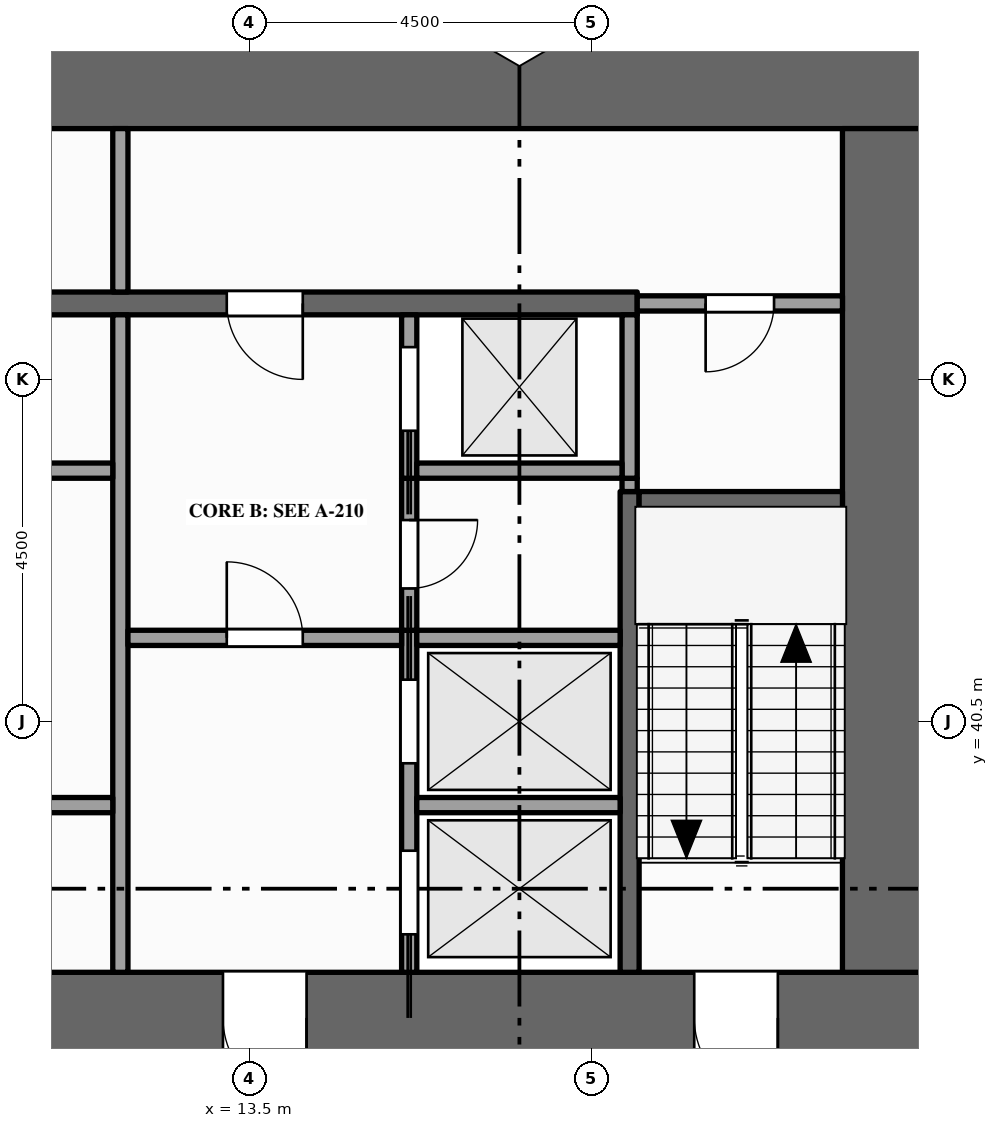
"""IFC4 building model, lengths in metres.
Left out: names, types, materials, properties, quantities, classifications, styles, units other than length and angle.
Written with IfcOpenShell. Run it as: python <this file> out.ifc"""

import sys

from ifc_helpers import new_model, si_unit, direction, frame, frame_2d, origin, place, context, subcontext, project, spatial, rectangle, extrude, element, fill, save


model = new_model("IFC4")
c1 = context("Model", 3, precision=1e-05, world=origin(), true_north=direction((0.0, 1.0)))
c2 = subcontext(c1, "Body", "Model", "MODEL_VIEW")
j1 = project(units=[si_unit("LENGTHUNIT", "METRE"), si_unit("PLANEANGLEUNIT", "RADIAN")], contexts=[c1])
p1 = place(None, origin())
s1 = spatial("IfcSite", under=j1, at=p1, CompositionType="ELEMENT")
p2 = place(p1, origin())
s2 = spatial("IfcBuilding", under=s1, at=p2, CompositionType="ELEMENT")
p3 = place(p2, frame((0.0, 0.0, 49.0)))
s3 = spatial("IfcBuildingStorey", under=s2, at=p3, CompositionType="ELEMENT", Elevation=49.0)
p4 = place(p3, frame((0.0, 36.6, -0.15), z_axis=(0.0, 0.0, 1.0), x_axis=(1.0, 0.0, 0.0)))
e1 = element("IfcWall", 1, at=p4, inside=s3, PredefinedType="SHEAR", context=c2, shape_type="SweptSolid", body=[
    extrude(rectangle(XDim=22.5, YDim=1.2, at=frame_2d((11.25, 0.0))), origin(), (0.0, 0.0, 1.0), 4.0),
])
p5 = place(p4, frame((7.1, 0.0, 0.15)))
e2 = element("IfcOpeningElement", 2, at=p5, cuts=e1, PredefinedType="OPENING", context=c2, shape_type="SweptSolid", body=[
    extrude(rectangle(XDim=1.8, YDim=2.1, at=frame_2d((0.9, 1.05))), frame((0.0, 0.61, 0.0), z_axis=(0.0, -1.0, 0.0), x_axis=(1.0, 0.0, 0.0)), (0.0, 0.0, 1.0), 1.22),
])
p6 = place(p4, frame((13.15, 0.0, 0.15)))
e3 = element("IfcOpeningElement", 3, at=p6, cuts=e1, PredefinedType="OPENING", context=c2, shape_type="SweptSolid", body=[
    extrude(rectangle(XDim=1.1, YDim=2.1, at=frame_2d((0.55, 1.05))), frame((0.0, 0.61, 0.0), z_axis=(0.0, -1.0, 0.0), x_axis=(1.0, 0.0, 0.0)), (0.0, 0.0, 1.0), 1.22),
])
p7 = place(p4, frame((2.15, 0.0, 0.15)))
e4 = element("IfcOpeningElement", 4, at=p7, cuts=e1, PredefinedType="OPENING", context=c2, shape_type="SweptSolid", body=[
    extrude(rectangle(XDim=1.1, YDim=2.1, at=frame_2d((0.55, 1.05))), frame((0.0, 0.61, 0.0), z_axis=(0.0, -1.0, 0.0), x_axis=(1.0, 0.0, 0.0)), (0.0, 0.0, 1.0), 1.22),
])
p8 = place(p4, frame((19.35, 0.0, 0.15)))
e5 = element("IfcOpeningElement", 5, at=p8, cuts=e1, PredefinedType="OPENING", context=c2, shape_type="SweptSolid", body=[
    extrude(rectangle(XDim=1.1, YDim=2.1, at=frame_2d((0.55, 1.05))), frame((0.0, 0.61, 0.0), z_axis=(0.0, -1.0, 0.0), x_axis=(1.0, 0.0, 0.0)), (0.0, 0.0, 1.0), 1.22),
])
p9 = place(p3, frame((0.0, 48.9, -0.15), z_axis=(0.0, 0.0, 1.0), x_axis=(1.0, 0.0, 0.0)))
e6 = element("IfcWall", 6, at=p9, inside=s3, PredefinedType="SHEAR", context=c2, shape_type="SweptSolid", body=[
    extrude(rectangle(XDim=22.5, YDim=1.2, at=frame_2d((11.25, 0.0))), origin(), (0.0, 0.0, 1.0), 4.0),
])
p10 = place(p3, frame((21.9, 37.2, -0.15), z_axis=(0.0, 0.0, 1.0), x_axis=(0.0, 1.0, 0.0)))
e7 = element("IfcWall", 7, at=p10, inside=s3, PredefinedType="SHEAR", context=c2, shape_type="SweptSolid", body=[
    extrude(rectangle(XDim=11.1, YDim=1.2, at=frame_2d((5.55, 0.0))), origin(), (0.0, 0.0, 1.0), 4.0),
])
p11 = place(p3, frame((11.8, 37.2, 0.0), z_axis=(0.0, 0.0, 1.0), x_axis=(0.0, 1.0, 0.0)))
e8 = element("IfcWall", 8, at=p11, inside=s3, PredefinedType="PARTITIONING", context=c2, shape_type="SweptSolid", body=[
    extrude(rectangle(XDim=8.65, YDim=0.2, at=frame_2d((4.325, 0.0))), origin(), (0.0, 0.0, 1.0), 3.85),
])
p12 = place(p3, frame((11.8, 46.15, 0.0), z_axis=(0.0, 0.0, 1.0), x_axis=(0.0, 1.0, 0.0)))
e9 = element("IfcWall", 9, at=p12, inside=s3, PredefinedType="PARTITIONING", context=c2, shape_type="SweptSolid", body=[
    extrude(rectangle(XDim=2.15, YDim=0.2, at=frame_2d((1.075, 0.0))), origin(), (0.0, 0.0, 1.0), 3.85),
])
p13 = place(p3, frame((15.6, 37.2, 0.0), z_axis=(0.0, 0.0, 1.0), x_axis=(0.0, 1.0, 0.0)))
e10 = element("IfcWall", 10, at=p13, inside=s3, PredefinedType="SOLIDWALL", context=c2, shape_type="SweptSolid", body=[
    extrude(rectangle(XDim=4.5, YDim=0.2, at=frame_2d((2.25, 0.0))), origin(), (0.0, 0.0, 1.0), 3.85),
])
p14 = place(p13, frame((0.5, 0.0, 0.012)))
e11 = element("IfcOpeningElement", 11, at=p14, cuts=e10, PredefinedType="OPENING", context=c2, shape_type="SweptSolid", body=[
    extrude(rectangle(XDim=1.1, YDim=2.1, at=frame_2d((0.55, 1.05))), frame((0.0, 0.11, 0.0), z_axis=(0.0, -1.0, 0.0), x_axis=(1.0, 0.0, 0.0)), (0.0, 0.0, 1.0), 0.22),
])
p15 = place(p13, frame((2.75, 0.0, 0.012)))
e12 = element("IfcOpeningElement", 12, at=p15, cuts=e10, PredefinedType="OPENING", context=c2, shape_type="SweptSolid", body=[
    extrude(rectangle(XDim=1.1, YDim=2.1, at=frame_2d((0.55, 1.05))), frame((0.0, 0.11, 0.0), z_axis=(0.0, -1.0, 0.0), x_axis=(1.0, 0.0, 0.0)), (0.0, 0.0, 1.0), 0.22),
])
p16 = place(p3, frame((15.6, 41.7, 0.0), z_axis=(0.0, 0.0, 1.0), x_axis=(0.0, 1.0, 0.0)))
e13 = element("IfcWall", 13, at=p16, inside=s3, PredefinedType="PARTITIONING", context=c2, shape_type="SweptSolid", body=[
    extrude(rectangle(XDim=2.0, YDim=0.2, at=frame_2d((1.0, 0.0))), origin(), (0.0, 0.0, 1.0), 3.85),
])
p17 = place(p16, frame((0.55, 0.0, 0.0)))
e14 = element("IfcOpeningElement", 14, at=p17, cuts=e13, PredefinedType="OPENING", context=c2, shape_type="SweptSolid", body=[
    extrude(rectangle(XDim=0.9, YDim=2.1, at=frame_2d((0.45, 1.05))), frame((0.0, 0.11, 0.0), z_axis=(0.0, -1.0, 0.0), x_axis=(1.0, 0.0, 0.0)), (0.0, 0.0, 1.0), 0.22),
])
p18 = place(p3, frame((15.6, 43.7, 0.0), z_axis=(0.0, 0.0, 1.0), x_axis=(0.0, 1.0, 0.0)))
e15 = element("IfcWall", 15, at=p18, inside=s3, PredefinedType="SOLIDWALL", context=c2, shape_type="SweptSolid", body=[
    extrude(rectangle(XDim=2.15, YDim=0.2, at=frame_2d((1.075, 0.0))), origin(), (0.0, 0.0, 1.0), 3.85),
])
p19 = place(p18, frame((0.625, 0.0, 0.012)))
e16 = element("IfcOpeningElement", 16, at=p19, cuts=e15, PredefinedType="OPENING", context=c2, shape_type="SweptSolid", body=[
    extrude(rectangle(XDim=1.1, YDim=2.1, at=frame_2d((0.55, 1.05))), frame((0.0, 0.11, 0.0), z_axis=(0.0, -1.0, 0.0), x_axis=(1.0, 0.0, 0.0)), (0.0, 0.0, 1.0), 0.22),
])
p20 = place(p3, frame((18.5, 37.2, 0.0), z_axis=(0.0, 0.0, 1.0), x_axis=(0.0, 1.0, 0.0)))
e17 = element("IfcWall", 17, at=p20, inside=s3, PredefinedType="SHEAR", context=c2, shape_type="SweptSolid", body=[
    extrude(rectangle(XDim=6.325, YDim=0.25, at=frame_2d((3.163, 0.0))), origin(), (0.0, 0.0, 1.0), 3.85),
])
p21 = place(p3, frame((18.5, 43.525, 0.0), z_axis=(0.0, 0.0, 1.0), x_axis=(0.0, 1.0, 0.0)))
e18 = element("IfcWall", 18, at=p21, inside=s3, PredefinedType="PARTITIONING", context=c2, shape_type="SweptSolid", body=[
    extrude(rectangle(XDim=0.175, YDim=0.2, at=frame_2d((0.087, 0.0))), origin(), (0.0, 0.0, 1.0), 3.85),
])
p22 = place(p3, frame((18.5, 43.7, 0.0), z_axis=(0.0, 0.0, 1.0), x_axis=(0.0, 1.0, 0.0)))
e19 = element("IfcWall", 19, at=p22, inside=s3, PredefinedType="SOLIDWALL", context=c2, shape_type="SweptSolid", body=[
    extrude(rectangle(XDim=2.15, YDim=0.2, at=frame_2d((1.075, 0.0))), origin(), (0.0, 0.0, 1.0), 3.85),
])
p23 = place(p3, frame((9.5, 39.4, 0.0), z_axis=(0.0, 0.0, 1.0), x_axis=(1.0, 0.0, 0.0)))
e20 = element("IfcWall", 20, at=p23, inside=s3, PredefinedType="PARTITIONING", context=c2, shape_type="SweptSolid", body=[
    extrude(rectangle(XDim=2.2, YDim=0.2, at=frame_2d((1.1, 0.0))), origin(), (0.0, 0.0, 1.0), 3.85),
])
p24 = place(p3, frame((15.7, 39.4, 0.0), z_axis=(0.0, 0.0, 1.0), x_axis=(1.0, 0.0, 0.0)))
e21 = element("IfcWall", 21, at=p24, inside=s3, PredefinedType="SOLIDWALL", context=c2, shape_type="SweptSolid", body=[
    extrude(rectangle(XDim=2.675, YDim=0.2, at=frame_2d((1.337, 0.0))), origin(), (0.0, 0.0, 1.0), 3.85),
])
p25 = place(p3, frame((11.9, 41.6, 0.0), z_axis=(0.0, 0.0, 1.0), x_axis=(1.0, 0.0, 0.0)))
e22 = element("IfcWall", 22, at=p25, inside=s3, PredefinedType="PARTITIONING", context=c2, shape_type="SweptSolid", body=[
    extrude(rectangle(XDim=3.6, YDim=0.2, at=frame_2d((1.8, 0.0))), origin(), (0.0, 0.0, 1.0), 3.85),
])
p26 = place(p25, frame((1.3, 0.0, 0.0)))
e23 = element("IfcOpeningElement", 23, at=p26, cuts=e22, PredefinedType="OPENING", context=c2, shape_type="SweptSolid", body=[
    extrude(rectangle(XDim=1.0, YDim=2.1, at=frame_2d((0.5, 1.05))), frame((0.0, 0.11, 0.0), z_axis=(0.0, -1.0, 0.0), x_axis=(1.0, 0.0, 0.0)), (0.0, 0.0, 1.0), 0.22),
])
p27 = place(p3, frame((15.7, 41.6, 0.0), z_axis=(0.0, 0.0, 1.0), x_axis=(1.0, 0.0, 0.0)))
e24 = element("IfcWall", 24, at=p27, inside=s3, PredefinedType="SOLIDWALL", context=c2, shape_type="SweptSolid", body=[
    extrude(rectangle(XDim=2.675, YDim=0.2, at=frame_2d((1.337, 0.0))), origin(), (0.0, 0.0, 1.0), 3.85),
])
p28 = place(p3, frame((18.625, 43.4, 0.0), z_axis=(0.0, 0.0, 1.0), x_axis=(1.0, 0.0, 0.0)))
e25 = element("IfcWall", 25, at=p28, inside=s3, PredefinedType="SHEAR", context=c2, shape_type="SweptSolid", body=[
    extrude(rectangle(XDim=2.675, YDim=0.25, at=frame_2d((1.337, 0.0))), origin(), (0.0, 0.0, 1.0), 3.85),
])
p29 = place(p3, frame((9.5, 43.8, 0.0), z_axis=(0.0, 0.0, 1.0), x_axis=(1.0, 0.0, 0.0)))
e26 = element("IfcWall", 26, at=p29, inside=s3, PredefinedType="PARTITIONING", context=c2, shape_type="SweptSolid", body=[
    extrude(rectangle(XDim=2.2, YDim=0.2, at=frame_2d((1.1, 0.0))), origin(), (0.0, 0.0, 1.0), 3.85),
])
p30 = place(p3, frame((15.7, 43.8, 0.0), z_axis=(0.0, 0.0, 1.0), x_axis=(1.0, 0.0, 0.0)))
e27 = element("IfcWall", 27, at=p30, inside=s3, PredefinedType="SOLIDWALL", context=c2, shape_type="SweptSolid", body=[
    extrude(rectangle(XDim=2.7, YDim=0.2, at=frame_2d((1.35, 0.0))), origin(), (0.0, 0.0, 1.0), 3.85),
])
p31 = place(p3, frame((4.1, 46.0, 0.0), z_axis=(0.0, 0.0, 1.0), x_axis=(1.0, 0.0, 0.0)))
e28 = element("IfcWall", 28, at=p31, inside=s3, PredefinedType="SHEAR", context=c2, shape_type="SweptSolid", body=[
    extrude(rectangle(XDim=14.5, YDim=0.3, at=frame_2d((7.25, 0.0))), origin(), (0.0, 0.0, 1.0), 3.85),
])
p32 = place(p31, frame((3.4, 0.0, 0.0)))
e29 = element("IfcOpeningElement", 29, at=p32, cuts=e28, PredefinedType="OPENING", context=c2, shape_type="SweptSolid", body=[
    extrude(rectangle(XDim=1.0, YDim=2.1, at=frame_2d((0.5, 1.05))), frame((0.0, 0.16, 0.0), z_axis=(0.0, -1.0, 0.0), x_axis=(1.0, 0.0, 0.0)), (0.0, 0.0, 1.0), 0.32),
])
p33 = place(p31, frame((9.1, 0.0, 0.0)))
e30 = element("IfcOpeningElement", 30, at=p33, cuts=e28, PredefinedType="OPENING", context=c2, shape_type="SweptSolid", body=[
    extrude(rectangle(XDim=1.0, YDim=2.1, at=frame_2d((0.5, 1.05))), frame((0.0, 0.16, 0.0), z_axis=(0.0, -1.0, 0.0), x_axis=(1.0, 0.0, 0.0)), (0.0, 0.0, 1.0), 0.32),
])
p34 = place(p3, frame((18.6, 46.0, 0.0), z_axis=(0.0, 0.0, 1.0), x_axis=(1.0, 0.0, 0.0)))
e31 = element("IfcWall", 31, at=p34, inside=s3, PredefinedType="PARTITIONING", context=c2, shape_type="SweptSolid", body=[
    extrude(rectangle(XDim=2.7, YDim=0.2, at=frame_2d((1.35, 0.0))), origin(), (0.0, 0.0, 1.0), 3.85),
])
p35 = place(p34, frame((0.9, 0.0, 0.0)))
e32 = element("IfcOpeningElement", 32, at=p35, cuts=e31, PredefinedType="OPENING", context=c2, shape_type="SweptSolid", body=[
    extrude(rectangle(XDim=0.9, YDim=2.1, at=frame_2d((0.45, 1.05))), frame((0.0, 0.11, 0.0), z_axis=(0.0, -1.0, 0.0), x_axis=(1.0, 0.0, 0.0)), (0.0, 0.0, 1.0), 0.22),
])
p36 = place(p14, origin())
e33 = element("IfcDoor", 33, at=p36, inside=s3, OperationType="SLIDING_TO_LEFT", PredefinedType="DOOR", context=c2, shape_type="SweptSolid", body=[
    extrude(rectangle(XDim=1.1, YDim=2.1, at=frame_2d((0.55, 1.05))), frame((0.0, 0.025, 0.0), z_axis=(0.0, -1.0, 0.0), x_axis=(1.0, 0.0, 0.0)), (0.0, 0.0, 1.0), 0.05),
])
fill(e11, e33)
p37 = place(p15, origin())
e34 = element("IfcDoor", 34, at=p37, inside=s3, OperationType="SLIDING_TO_RIGHT", PredefinedType="DOOR", context=c2, shape_type="SweptSolid", body=[
    extrude(rectangle(XDim=1.1, YDim=2.1, at=frame_2d((0.55, 1.05))), frame((0.0, 0.025, 0.0), z_axis=(0.0, -1.0, 0.0), x_axis=(1.0, 0.0, 0.0)), (0.0, 0.0, 1.0), 0.05),
])
fill(e12, e34)
p38 = place(p19, origin())
e35 = element("IfcDoor", 35, at=p38, inside=s3, OperationType="SLIDING_TO_LEFT", PredefinedType="DOOR", context=c2, shape_type="SweptSolid", body=[
    extrude(rectangle(XDim=1.1, YDim=2.1, at=frame_2d((0.55, 1.05))), frame((0.0, 0.025, 0.0), z_axis=(0.0, -1.0, 0.0), x_axis=(1.0, 0.0, 0.0)), (0.0, 0.0, 1.0), 0.05),
])
fill(e16, e35)
p39 = place(p6, origin())
e36 = element("IfcDoor", 36, at=p39, inside=s3, OperationType="SINGLE_SWING_RIGHT", PredefinedType="DOOR", context=c2, shape_type="SweptSolid", body=[
    extrude(rectangle(XDim=1.1, YDim=2.1, at=frame_2d((0.55, 1.05))), frame((0.0, 0.025, 0.0), z_axis=(0.0, -1.0, 0.0), x_axis=(1.0, 0.0, 0.0)), (0.0, 0.0, 1.0), 0.05),
])
fill(e3, e36)
p40 = place(p26, origin())
e37 = element("IfcDoor", 37, at=p40, inside=s3, OperationType="SINGLE_SWING_LEFT", PredefinedType="DOOR", context=c2, shape_type="SweptSolid", body=[
    extrude(rectangle(XDim=1.0, YDim=2.1, at=frame_2d((0.5, 1.05))), frame((0.0, 0.025, 0.0), z_axis=(0.0, -1.0, 0.0), x_axis=(1.0, 0.0, 0.0)), (0.0, 0.0, 1.0), 0.05),
])
fill(e23, e37)
p41 = place(p33, origin())
e38 = element("IfcDoor", 38, at=p41, inside=s3, OperationType="SINGLE_SWING_RIGHT", PredefinedType="DOOR", context=c2, shape_type="SweptSolid", body=[
    extrude(rectangle(XDim=1.0, YDim=2.1, at=frame_2d((0.5, 1.05))), frame((0.0, 0.025, 0.0), z_axis=(0.0, -1.0, 0.0), x_axis=(1.0, 0.0, 0.0)), (0.0, 0.0, 1.0), 0.05),
])
fill(e30, e38)
p42 = place(p8, origin())
e39 = element("IfcDoor", 39, at=p42, inside=s3, OperationType="SINGLE_SWING_RIGHT", PredefinedType="DOOR", context=c2, shape_type="SweptSolid", body=[
    extrude(rectangle(XDim=1.1, YDim=2.1, at=frame_2d((0.55, 1.05))), frame((0.0, 0.025, 0.0), z_axis=(0.0, -1.0, 0.0), x_axis=(1.0, 0.0, 0.0)), (0.0, 0.0, 1.0), 0.05),
])
fill(e5, e39)
p43 = place(p35, origin())
e40 = element("IfcDoor", 40, at=p43, inside=s3, OperationType="SINGLE_SWING_LEFT", PredefinedType="DOOR", context=c2, shape_type="SweptSolid", body=[
    extrude(rectangle(XDim=0.9, YDim=2.1, at=frame_2d((0.45, 1.05))), frame((0.0, 0.025, 0.0), z_axis=(0.0, -1.0, 0.0), x_axis=(1.0, 0.0, 0.0)), (0.0, 0.0, 1.0), 0.05),
])
fill(e32, e40)
p44 = place(p17, origin())
e41 = element("IfcDoor", 41, at=p44, inside=s3, OperationType="SINGLE_SWING_RIGHT", PredefinedType="DOOR", context=c2, shape_type="SweptSolid", body=[
    extrude(rectangle(XDim=0.9, YDim=2.1, at=frame_2d((0.45, 1.05))), frame((0.0, 0.025, 0.0), z_axis=(0.0, -1.0, 0.0), x_axis=(1.0, 0.0, 0.0)), (0.0, 0.0, 1.0), 0.05),
])
fill(e14, e41)
save(model, sys.argv[1])
